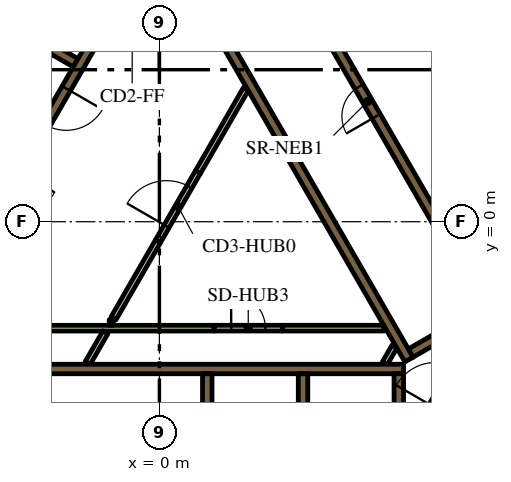
"""IFC4 building model, lengths in metres.
Left out: names, types, materials, properties, quantities, classifications, styles, units other than length and angle.
Written with IfcOpenShell. Run it as: python <this file> out.ifc"""

import sys

from ifc_helpers import new_model, si_unit, direction, frame, frame_2d, origin, place, context, subcontext, project, spatial, polyline, rectangle, outline, extrude, element, fill, save


model = new_model("IFC4")
c1 = context("Model", 3, precision=1e-05, world=origin(), true_north=direction((0.0, 1.0)))
c2 = subcontext(c1, "Body", "Model", "MODEL_VIEW")
j1 = project(units=[si_unit("LENGTHUNIT", "METRE"), si_unit("PLANEANGLEUNIT", "RADIAN")], contexts=[c1])
p1 = place(None, origin())
s1 = spatial("IfcSite", under=j1, at=p1, CompositionType="ELEMENT")
p2 = place(p1, origin())
s2 = spatial("IfcBuilding", under=s1, at=p2, CompositionType="ELEMENT")
p3 = place(p2, frame((0.0, 0.0, 126.6)))
s3 = spatial("IfcBuildingStorey", under=s2, at=p3, CompositionType="ELEMENT", Elevation=126.6)
p4 = place(p3, frame((6.776, 13.364, 0.0), z_axis=(0.0, 0.0, 1.0), x_axis=(0.500004177138, -0.8660229921, 0.0)))
e1 = element("IfcWall", 1, at=p4, inside=s3, PredefinedType="SOLIDWALL", context=c2, shape_type="SweptSolid", body=[
    extrude(rectangle(XDim=20.204, YDim=0.9, at=frame_2d((10.102, 0.0))), origin(), (0.0, 0.0, 1.0), 3.9),
])
p5 = place(p3, frame((-6.19, -3.875, 0.0), z_axis=(0.0, 0.0, 1.0), x_axis=(1.0, 0.0, 0.0)))
e2 = element("IfcWall", 2, at=p5, inside=s3, PredefinedType="SOLIDWALL", context=c2, shape_type="SweptSolid", body=[
    extrude(rectangle(XDim=12.615, YDim=0.25, at=frame_2d((6.307, 0.0))), origin(), (0.0, 0.0, 1.0), 3.9),
])
p6 = place(p3, frame((6.3, -7.268, 0.0), z_axis=(0.0, 0.0, 1.0), x_axis=(0.0, 1.0, 0.0)))
e3 = element("IfcWall", 3, at=p6, inside=s3, PredefinedType="SOLIDWALL", context=c2, shape_type="SweptSolid", body=[
    extrude(rectangle(XDim=3.268, YDim=0.25, at=frame_2d((1.634, 0.0))), origin(), (0.0, 0.0, 1.0), 3.9),
])
for number, where, z_axis, x_axis in (
    (4, (3.78, -4.0, 0.0), (0.0, 0.0, 1.0), (0.0, -1.0, 0.0)),
    (5, (1.26, -4.0, 0.0), (0.0, 0.0, 1.0), (0.0, -1.0, 0.0)),
):
    element("IfcWall", number, at=place(p3, frame(where, z_axis=z_axis, x_axis=x_axis)), inside=s3, PredefinedType="SOLIDWALL", context=c2, shape_type="SweptSolid", body=[
        extrude(rectangle(XDim=2.2, YDim=0.25, at=frame_2d((1.1, 0.0))), origin(), (0.0, 0.0, 1.0), 3.9),
    ])
p7 = place(p3, origin())
e6 = element("IfcWall", 6, at=p7, inside=s3, PredefinedType="SOLIDWALL", context=c2, shape_type="SweptSolid", body=[
    extrude(outline(polyline([(0.335, 6.925), (0.335, 6.925), (0.335, 7.075), (0.335, 7.075), (0.335, 7.075), (0.245, 7.075), (0.079, 7.363), (0.035, 7.439), (0.252, 7.564), (0.377, 7.348), (6.552, -3.348), (6.677, -3.564), (6.46, -3.689), (4.897, -0.981), (0.332, 6.925), (0.335, 6.925), (0.335, 6.925)])), origin(), (0.0, 0.0, 1.0), 3.9),
])
p8 = place(p3, frame((9.352, -1.875, 0.0), z_axis=(0.0, 0.0, 1.0), x_axis=(-0.866024844342, -0.500000968981, 0.0)))
e7 = element("IfcWall", 7, at=p8, inside=s3, PredefinedType="SOLIDWALL", context=c2, shape_type="SweptSolid", body=[
    extrude(rectangle(XDim=3.162, YDim=0.25, at=frame_2d((1.581, 0.0))), origin(), (0.0, 0.0, 1.0), 3.9),
])
p9 = place(p3, frame((-8.06, -1.311, 0.0), z_axis=(0.0, 0.0, 1.0), x_axis=(0.50000273126, 0.866023826885, 0.0)))
e8 = element("IfcWall", 8, at=p9, inside=s3, PredefinedType="SOLIDWALL", context=c2, shape_type="SweptSolid", body=[
    extrude(rectangle(XDim=10.33, YDim=0.25, at=frame_2d((5.165, 0.0))), origin(), (0.0, 0.0, 1.0), 3.9),
])
p10 = place(p3, frame((-2.204, 4.182, 0.0), z_axis=(0.0, 0.0, 1.0), x_axis=(-0.866008176907, 0.50002983664, 0.0)))
e9 = element("IfcWall", 9, at=p10, inside=s3, PredefinedType="SOLIDWALL", context=c2, shape_type="SweptSolid", body=[
    extrude(rectangle(XDim=2.2, YDim=0.25, at=frame_2d((1.1, 0.0))), origin(), (0.0, 0.0, 1.0), 3.9),
])
p11 = place(p3, frame((-6.086, -2.801, 0.0), z_axis=(0.0, 0.0, 1.0), x_axis=(1.0, 0.0, 0.0)))
e10 = element("IfcWall", 10, at=p11, inside=s3, PredefinedType="PARTITIONING", context=c2, shape_type="SweptSolid", body=[
    extrude(rectangle(XDim=7.524, YDim=0.15, at=frame_2d((3.762, 0.0))), origin(), (0.0, 0.0, 1.0), 2.75),
])
p12 = place(p3, frame((-1.887, -3.718, 0.0), z_axis=(0.0, 0.0, 1.0), x_axis=(0.499842898591, 0.866116087328, 0.0)))
e11 = element("IfcWall", 11, at=p12, inside=s3, PredefinedType="PARTITIONING", context=c2, shape_type="SweptSolid", body=[
    extrude(rectangle(XDim=0.936, YDim=0.15, at=frame_2d((0.468, 0.0))), origin(), (0.0, 0.0, 1.0), 2.75),
])
p13 = place(p3, frame((-1.212, -2.651, 0.0), z_axis=(0.0, 0.0, 1.0), x_axis=(-1.0, 0.0, 0.0)))
e12 = element("IfcWall", 12, at=p13, inside=s3, PredefinedType="PARTITIONING", context=c2, shape_type="SweptSolid", body=[
    extrude(rectangle(XDim=0.108, YDim=0.15, at=frame_2d((0.054, 0.0))), origin(), (0.0, 0.0, 1.0), 2.75),
])
p14 = place(p3, frame((-1.208, -2.544, 0.0), z_axis=(0.0, 0.0, 1.0), x_axis=(0.499995339376, 0.86602809458, 0.0)))
e13 = element("IfcWall", 13, at=p14, inside=s3, PredefinedType="PARTITIONING", context=c2, shape_type="SweptSolid", body=[
    extrude(rectangle(XDim=2.349, YDim=0.15, at=frame_2d((1.175, 0.0))), origin(), (0.0, 0.0, 1.0), 2.75),
])
p15 = place(p3, frame((5.936, -3.718, 0.0), z_axis=(0.0, 0.0, 1.0), x_axis=(0.499890179513, 0.866088799389, 0.0)))
e14 = element("IfcWall", 14, at=p15, inside=s3, PredefinedType="PARTITIONING", context=c2, shape_type="SweptSolid", body=[
    extrude(rectangle(XDim=0.504, YDim=0.15, at=frame_2d((0.252, 0.0))), origin(), (0.0, 0.0, 1.0), 2.75),
])
p16 = place(p3, frame((3.238, -2.8, 0.0), z_axis=(0.0, 0.0, 1.0), x_axis=(1.0, 0.0, 0.0)))
e15 = element("IfcWall", 15, at=p16, inside=s3, PredefinedType="PARTITIONING", context=c2, shape_type="SweptSolid", body=[
    extrude(rectangle(XDim=2.672, YDim=0.15, at=frame_2d((1.336, 0.0))), origin(), (0.0, 0.0, 1.0), 2.75),
])
p17 = place(p3, frame((1.016, 1.309, 0.0), z_axis=(0.0, 0.0, 1.0), x_axis=(0.49998231768, 0.866035612436, 0.0)))
e16 = element("IfcWall", 16, at=p17, inside=s3, PredefinedType="PARTITIONING", context=c2, shape_type="SweptSolid", body=[
    extrude(rectangle(XDim=2.521, YDim=0.15, at=frame_2d((1.26, 0.0))), origin(), (0.0, 0.0, 1.0), 2.75),
])
p18 = place(p3, frame((11.553, -0.46, 0.0), z_axis=(0.0, 0.0, 1.0), x_axis=(-0.500006514828, 0.866021642414, 0.0)))
e17 = element("IfcWall", 17, at=p18, inside=s3, PredefinedType="SOLIDWALL", context=c2, shape_type="SweptSolid", body=[
    extrude(rectangle(XDim=12.35, YDim=0.25, at=frame_2d((6.175, 0.0))), origin(), (0.0, 0.0, 1.0), 3.9),
])
p19 = place(p18, frame((0.585, 0.0, 0.0)))
e18 = element("IfcOpeningElement", 18, at=p19, cuts=e17, PredefinedType="OPENING", context=c2, shape_type="SweptSolid", body=[
    extrude(rectangle(XDim=1.1, YDim=2.1, at=frame_2d((0.55, 1.05))), frame((0.0, 0.135, 0.0), z_axis=(0.0, -1.0, 0.0), x_axis=(1.0, 0.0, 0.0)), (0.0, 0.0, 1.0), 0.27),
])
p20 = place(p18, frame((3.105, 0.0, 0.0)))
e19 = element("IfcOpeningElement", 19, at=p20, cuts=e17, PredefinedType="OPENING", context=c2, shape_type="SweptSolid", body=[
    extrude(rectangle(XDim=1.1, YDim=2.1, at=frame_2d((0.55, 1.05))), frame((0.0, 0.135, 0.0), z_axis=(0.0, -1.0, 0.0), x_axis=(1.0, 0.0, 0.0)), (0.0, 0.0, 1.0), 0.27),
])
p21 = place(p18, frame((5.625, 0.0, 0.0)))
e20 = element("IfcOpeningElement", 20, at=p21, cuts=e17, PredefinedType="OPENING", context=c2, shape_type="SweptSolid", body=[
    extrude(rectangle(XDim=1.1, YDim=2.1, at=frame_2d((0.55, 1.05))), frame((0.0, 0.135, 0.0), z_axis=(0.0, -1.0, 0.0), x_axis=(1.0, 0.0, 0.0)), (0.0, 0.0, 1.0), 0.27),
])
p22 = place(p3, frame((8.565, -2.185, 0.0), z_axis=(0.0, 0.0, 1.0), x_axis=(-0.499997954832, 0.866026584559, 0.0)))
e21 = element("IfcWall", 21, at=p22, inside=s3, PredefinedType="SOLIDWALL", context=c2, shape_type="SweptSolid", body=[
    extrude(rectangle(XDim=12.35, YDim=0.25, at=frame_2d((6.175, 0.0))), origin(), (0.0, 0.0, 1.0), 3.9),
])
p23 = place(p22, frame((5.725, 0.0, 0.0)))
e22 = element("IfcOpeningElement", 22, at=p23, cuts=e21, PredefinedType="OPENING", context=c2, shape_type="SweptSolid", body=[
    extrude(rectangle(XDim=0.9, YDim=2.1, at=frame_2d((0.45, 1.05))), frame((0.0, 0.135, 0.0), z_axis=(0.0, -1.0, 0.0), x_axis=(1.0, 0.0, 0.0)), (0.0, 0.0, 1.0), 0.27),
])
p24 = place(p3, frame((-0.898, 6.194, 0.0), z_axis=(0.0, 0.0, 1.0), x_axis=(-0.499996202215, -0.866027596426, 0.0)))
e23 = element("IfcWall", 23, at=p24, inside=s3, PredefinedType="SOLIDWALL", context=c2, shape_type="SweptSolid", body=[
    extrude(rectangle(XDim=9.83, YDim=0.25, at=frame_2d((4.915, 0.0))), origin(), (0.0, 0.0, 1.0), 3.9),
])
p25 = place(p24, frame((0.585, 0.0, 0.0)))
e24 = element("IfcOpeningElement", 24, at=p25, cuts=e23, PredefinedType="OPENING", context=c2, shape_type="SweptSolid", body=[
    extrude(rectangle(XDim=1.1, YDim=2.1, at=frame_2d((0.55, 1.05))), frame((0.0, 0.135, 0.0), z_axis=(0.0, -1.0, 0.0), x_axis=(1.0, 0.0, 0.0)), (0.0, 0.0, 1.0), 0.27),
])
p26 = place(p24, frame((3.105, 0.0, 0.0)))
e25 = element("IfcOpeningElement", 25, at=p26, cuts=e23, PredefinedType="OPENING", context=c2, shape_type="SweptSolid", body=[
    extrude(rectangle(XDim=1.1, YDim=2.1, at=frame_2d((0.55, 1.05))), frame((0.0, 0.135, 0.0), z_axis=(0.0, -1.0, 0.0), x_axis=(1.0, 0.0, 0.0)), (0.0, 0.0, 1.0), 0.27),
])
p27 = place(p24, frame((5.625, 0.0, 0.0)))
e26 = element("IfcOpeningElement", 26, at=p27, cuts=e23, PredefinedType="OPENING", context=c2, shape_type="SweptSolid", body=[
    extrude(rectangle(XDim=1.1, YDim=2.1, at=frame_2d((0.55, 1.05))), frame((0.0, 0.135, 0.0), z_axis=(0.0, -1.0, 0.0), x_axis=(1.0, 0.0, 0.0)), (0.0, 0.0, 1.0), 0.27),
])
p28 = place(p24, frame((8.145, 0.0, 0.0)))
e27 = element("IfcOpeningElement", 27, at=p28, cuts=e23, PredefinedType="OPENING", context=c2, shape_type="SweptSolid", body=[
    extrude(rectangle(XDim=1.1, YDim=2.1, at=frame_2d((0.55, 1.05))), frame((0.0, 0.135, 0.0), z_axis=(0.0, -1.0, 0.0), x_axis=(1.0, 0.0, 0.0)), (0.0, 0.0, 1.0), 0.27),
])
p29 = place(p3, frame((7.048, -5.292, 0.0), z_axis=(0.0, 0.0, 1.0), x_axis=(0.49994051562, 0.866059744384, 0.0)))
e28 = element("IfcWall", 28, at=p29, inside=s3, PredefinedType="SOLIDWALL", context=c2, shape_type="SweptSolid", body=[
    extrude(rectangle(XDim=2.1, YDim=0.4, at=frame_2d((1.05, 0.0))), origin(), (0.0, 0.0, 1.0), 3.9),
])
p30 = place(p29, frame((0.45, 0.0, 0.0)))
e29 = element("IfcOpeningElement", 29, at=p30, cuts=e28, PredefinedType="OPENING", context=c2, shape_type="SweptSolid", body=[
    extrude(rectangle(XDim=1.2, YDim=2.1, at=frame_2d((0.6, 1.05))), frame((0.0, 0.21, 0.0), z_axis=(0.0, -1.0, 0.0), x_axis=(1.0, 0.0, 0.0)), (0.0, 0.0, 1.0), 0.42),
])
p31 = place(p3, frame((-0.034, -0.509, 0.0), z_axis=(0.0, 0.0, 1.0), x_axis=(0.49994051562, 0.866059744384, 0.0)))
e30 = element("IfcWall", 30, at=p31, inside=s3, PredefinedType="PARTITIONING", context=c2, shape_type="SweptSolid", body=[
    extrude(rectangle(XDim=2.1, YDim=0.15, at=frame_2d((1.05, 0.0))), origin(), (0.0, 0.0, 1.0), 2.75),
])
p32 = place(p31, frame((0.45, 0.0, 0.0)))
e31 = element("IfcOpeningElement", 31, at=p32, cuts=e30, PredefinedType="OPENING", context=c2, shape_type="SweptSolid", body=[
    extrude(rectangle(XDim=1.2, YDim=2.1, at=frame_2d((0.6, 1.05))), frame((0.0, 0.085, 0.0), z_axis=(0.0, -1.0, 0.0), x_axis=(1.0, 0.0, 0.0)), (0.0, 0.0, 1.0), 0.17),
])
p33 = place(p3, frame((1.438, -2.8, 0.0), z_axis=(0.0, 0.0, 1.0), x_axis=(1.0, 0.0, 0.0)))
e32 = element("IfcWall", 32, at=p33, inside=s3, PredefinedType="PARTITIONING", context=c2, shape_type="SweptSolid", body=[
    extrude(rectangle(XDim=1.8, YDim=0.15, at=frame_2d((0.9, 0.0))), origin(), (0.0, 0.0, 1.0), 2.75),
])
p34 = place(p33, frame((0.45, 0.0, 0.0)))
e33 = element("IfcOpeningElement", 33, at=p34, cuts=e32, PredefinedType="OPENING", context=c2, shape_type="SweptSolid", body=[
    extrude(rectangle(XDim=0.9, YDim=2.1, at=frame_2d((0.45, 1.05))), frame((0.0, 0.085, 0.0), z_axis=(0.0, -1.0, 0.0), x_axis=(1.0, 0.0, 0.0)), (0.0, 0.0, 1.0), 0.17),
])
p35 = place(p3, frame((6.163, 18.475, 0.0), z_axis=(0.0, 0.0, 1.0), x_axis=(0.500001317485, -0.866024643133, 0.0)))
e34 = element("IfcWall", 34, at=p35, inside=s3, PredefinedType="PARTITIONING", context=c2, shape_type="SweptSolid", body=[
    extrude(rectangle(XDim=25.767, YDim=0.15, at=frame_2d((12.883, 0.0))), origin(), (0.0, 0.0, 1.0), 2.75),
])
p36 = place(p35, frame((19.306, 0.0, 0.0)))
e35 = element("IfcOpeningElement", 35, at=p36, cuts=e34, PredefinedType="OPENING", context=c2, shape_type="SweptSolid", body=[
    extrude(rectangle(XDim=1.0, YDim=2.1, at=frame_2d((0.5, 1.05))), frame((0.0, 0.085, 0.0), z_axis=(0.0, -1.0, 0.0), x_axis=(1.0, 0.0, 0.0)), (0.0, 0.0, 1.0), 0.17),
])
p37 = place(p35, frame((17.999, 0.0, 0.0)))
e36 = element("IfcOpeningElement", 36, at=p37, cuts=e34, PredefinedType="OPENING", context=c2, shape_type="SweptSolid", body=[
    extrude(rectangle(XDim=1.0, YDim=2.1, at=frame_2d((0.5, 1.05))), frame((0.0, 0.085, 0.0), z_axis=(0.0, -1.0, 0.0), x_axis=(1.0, 0.0, 0.0)), (0.0, 0.0, 1.0), 0.17),
])
p38 = place(p35, frame((0.596, 0.0, 0.0)))
e37 = element("IfcOpeningElement", 37, at=p38, cuts=e34, PredefinedType="OPENING", context=c2, shape_type="SweptSolid", body=[
    extrude(rectangle(XDim=1.0, YDim=2.1, at=frame_2d((0.5, 1.05))), frame((0.0, 0.085, 0.0), z_axis=(0.0, -1.0, 0.0), x_axis=(1.0, 0.0, 0.0)), (0.0, 0.0, 1.0), 0.17),
])
p39 = place(p23, origin())
e38 = element("IfcDoor", 38, at=p39, inside=s3, OperationType="SINGLE_SWING_LEFT", PredefinedType="DOOR", context=c2, shape_type="SweptSolid", body=[
    extrude(rectangle(XDim=0.9, YDim=2.1, at=frame_2d((0.45, 1.05))), frame((0.0, 0.025, 0.0), z_axis=(0.0, -1.0, 0.0), x_axis=(1.0, 0.0, 0.0)), (0.0, 0.0, 1.0), 0.05),
])
fill(e22, e38)
p40 = place(p26, origin())
e39 = element("IfcDoor", 39, at=p40, inside=s3, OperationType="DOUBLE_DOOR_SLIDING", PredefinedType="DOOR", context=c2, shape_type="SweptSolid", body=[
    extrude(rectangle(XDim=1.1, YDim=2.1, at=frame_2d((0.55, 1.05))), frame((0.0, 0.025, 0.0), z_axis=(0.0, -1.0, 0.0), x_axis=(1.0, 0.0, 0.0)), (0.0, 0.0, 1.0), 0.05),
])
fill(e25, e39)
p41 = place(p32, origin())
e40 = element("IfcDoor", 40, at=p41, inside=s3, OperationType="SINGLE_SWING_LEFT", PredefinedType="DOOR", context=c2, shape_type="SweptSolid", body=[
    extrude(rectangle(XDim=1.2, YDim=2.1, at=frame_2d((0.6, 1.05))), frame((0.0, 0.025, 0.0), z_axis=(0.0, -1.0, 0.0), x_axis=(1.0, 0.0, 0.0)), (0.0, 0.0, 1.0), 0.05),
])
fill(e31, e40)
p42 = place(p34, origin())
e41 = element("IfcDoor", 41, at=p42, inside=s3, OperationType="SINGLE_SWING_LEFT", PredefinedType="DOOR", context=c2, shape_type="SweptSolid", body=[
    extrude(rectangle(XDim=0.9, YDim=2.1, at=frame_2d((0.45, 1.05))), frame((0.0, 0.025, 0.0), z_axis=(0.0, -1.0, 0.0), x_axis=(1.0, 0.0, 0.0)), (0.0, 0.0, 1.0), 0.05),
])
fill(e33, e41)
save(model, sys.argv[1])
